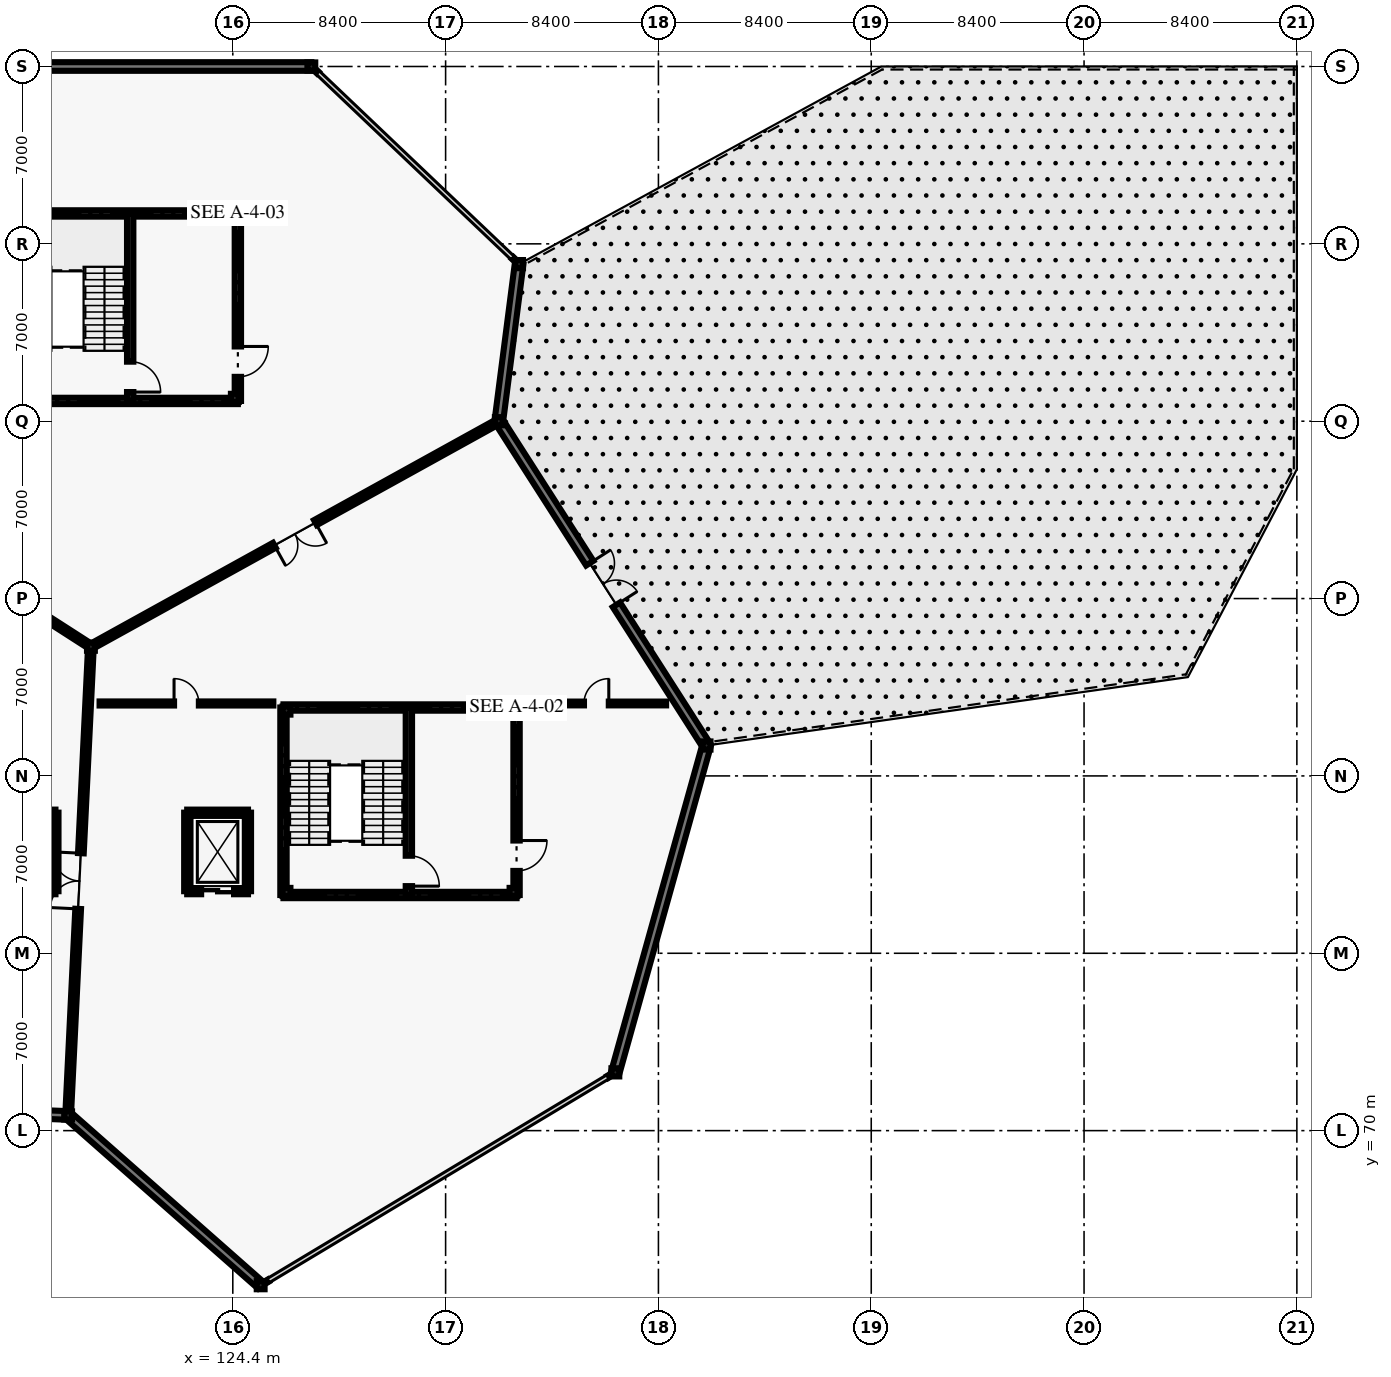
"""IFC4 building model, lengths in metres.
Left out: names, types, materials, properties, quantities, classifications, styles, units other than length and angle.
Written with IfcOpenShell. Run it as: python <this file> out.ifc"""

import sys

from ifc_helpers import new_model, si_unit, direction, frame, frame_2d, origin, origin_2d, place, context, subcontext, project, spatial, rectangle, i_section, extrude, element, fill, save


model = new_model("IFC4")
c1 = context("Model", 3, precision=1e-05, world=origin(), true_north=direction((0.0, 1.0)))
c2 = subcontext(c1, "Body", "Model", "MODEL_VIEW")
j1 = project(units=[si_unit("LENGTHUNIT", "METRE"), si_unit("PLANEANGLEUNIT", "RADIAN")], contexts=[c1])
p1 = place(None, origin())
s1 = spatial("IfcSite", under=j1, at=p1, CompositionType="ELEMENT")
p2 = place(p1, origin())
s2 = spatial("IfcBuilding", under=s1, at=p2, CompositionType="ELEMENT")
p3 = place(p2, frame((0.0, 0.0, 15.0)))
s3 = spatial("IfcBuildingStorey", under=s2, at=p3, CompositionType="ELEMENT", Elevation=15.0)
for number, where, z_axis, x_axis in (
    (1, (117.9, 70.6, 0.0), (0.0, 0.0, 1.0), (1.0, 0.0, 0.0)),
    (2, (118.8, 89.1, 0.0), (0.0, 0.0, 1.0), (1.0, 0.0, 0.0)),
    (3, (125.5, 63.9, 0.0), (0.0, 0.0, 1.0), (1.0, 0.0, 0.0)),
    (4, (127.5, 112.0, 0.0), (0.0, 0.0, 1.0), (1.0, 0.0, 0.0)),
    (5, (134.9, 98.0, 0.0), (0.0, 0.0, 1.0), (1.0, 0.0, 0.0)),
    (6, (135.7, 104.2, 0.0), (0.0, 0.0, 1.0), (1.0, 0.0, 0.0)),
    (7, (139.5, 72.3, 0.0), (0.0, 0.0, 1.0), (1.0, 0.0, 0.0)),
    (8, (143.1, 85.2, 0.0), (0.0, 0.0, 1.0), (1.0, 0.0, 0.0)),
    (9, (126.52, 79.42, 0.0), (0.0, 0.0, 1.0), (1.0, 0.0, 0.0)),
    (10, (135.48, 79.42, 0.0), (0.0, 0.0, 1.0), (1.0, 0.0, 0.0)),
    (11, (135.48, 86.58, 0.0), (0.0, 0.0, 1.0), (1.0, 0.0, 0.0)),
    (12, (126.52, 86.58, 0.0), (0.0, 0.0, 1.0), (1.0, 0.0, 0.0)),
    (13, (124.48, 98.92, 0.0), (0.0, 0.0, 1.0), (1.0, 0.0, 0.0)),
    (14, (124.48, 106.08, 0.0), (0.0, 0.0, 1.0), (1.0, 0.0, 0.0)),
):
    element("IfcColumn", number, at=place(p3, frame(where, z_axis=z_axis, x_axis=x_axis)), inside=s3, PredefinedType="COLUMN", context=c2, shape_type="SweptSolid", body=[
        extrude(i_section(OverallWidth=0.309, OverallDepth=0.321, WebThickness=0.014, FlangeThickness=0.022, FilletRadius=0.017, at=origin_2d()), origin(), (0.0, 0.0, 1.0), 4.8),
    ])
p4 = place(p3, frame((117.84, 70.602, 0.0), z_axis=(0.0, 0.0, 1.0), x_axis=(-0.999284381651, 0.037824920194, 0.0)))
e15 = element("IfcWall", 15, at=p4, inside=s3, PredefinedType="SOLIDWALL", context=c2, shape_type="SweptSolid", body=[
    extrude(rectangle(XDim=18.453, YDim=0.34, at=frame_2d((9.227, 0.0))), origin(), (0.0, 0.0, 1.0), 3.62),
])
p5 = place(p3, frame((125.5, 63.9, 0.0), z_axis=(0.0, 0.0, 1.0), x_axis=(-0.750131359252, 0.661288850554, 0.0)))
e16 = element("IfcWall", 16, at=p5, inside=s3, PredefinedType="SOLIDWALL", context=c2, shape_type="SweptSolid", body=[
    extrude(rectangle(XDim=10.072, YDim=0.34, at=frame_2d((5.036, 0.0))), origin(), (0.0, 0.0, 1.0), 3.62),
])
for number, where, z_axis, x_axis in (
    (17, (139.464, 72.278, 0.0), (0.0, 0.0, 1.0), (-0.858, -0.513, 0.0)),
    (18, (125.8, 64.08, 0.0), (0.0, 0.0, 1.0), (-0.858, -0.513, 0.0)),
):
    element("IfcWall", number, at=place(p3, frame(where, z_axis=z_axis, x_axis=x_axis)), inside=s3, PredefinedType="SOLIDWALL", context=c2, shape_type="SweptSolid", body=[
        extrude(rectangle(XDim=0.308, YDim=0.095, at=frame_2d((0.154, 0.0))), origin(), (0.0, 0.0, 1.0), 3.62),
    ])
p6 = place(p3, frame((143.1, 85.2, 0.0), z_axis=(0.0, 0.0, 1.0), x_axis=(-0.268807620494, -0.96319388659, 0.0)))
e19 = element("IfcWall", 19, at=p6, inside=s3, PredefinedType="SOLIDWALL", context=c2, shape_type="SweptSolid", body=[
    extrude(rectangle(XDim=13.393, YDim=0.34, at=frame_2d((6.696, 0.0))), origin(), (0.0, 0.0, 1.0), 3.62),
])
p7 = place(p3, frame((134.932, 97.95, 0.0), z_axis=(0.0, 0.0, 1.0), x_axis=(0.539438422375, -0.84202505216, 0.0)))
e20 = element("IfcWall", 20, at=p7, inside=s3, PredefinedType="SOLIDWALL", context=c2, shape_type="SweptSolid", body=[
    extrude(rectangle(XDim=15.142, YDim=0.34, at=frame_2d((7.571, 0.0))), origin(), (0.0, 0.0, 1.0), 3.62),
])
p8 = place(p7, frame((6.596, 0.0, 0.0)))
e21 = element("IfcOpeningElement", 21, at=p8, cuts=e20, PredefinedType="OPENING", context=c2, shape_type="SweptSolid", body=[
    extrude(rectangle(XDim=1.95, YDim=2.3, at=frame_2d((0.975, 1.15))), frame((0.0, 0.18, 0.0), z_axis=(0.0, -1.0, 0.0), x_axis=(1.0, 0.0, 0.0)), (0.0, 0.0, 1.0), 0.36),
])
p9 = place(p3, frame((135.7, 104.2, 0.0), z_axis=(0.0, 0.0, 1.0), x_axis=(-0.127911284164, -0.99178561362, 0.0)))
e22 = element("IfcWall", 22, at=p9, inside=s3, PredefinedType="SOLIDWALL", context=c2, shape_type="SweptSolid", body=[
    extrude(rectangle(XDim=6.192, YDim=0.34, at=frame_2d((3.096, 0.0))), origin(), (0.0, 0.0, 1.0), 3.62),
])
for number, where, z_axis, x_axis in (
    (23, (127.53, 111.971, 0.0), (0.0, 0.0, 1.0), (0.726, -0.687, 0.0)),
    (24, (135.446, 104.441, 0.0), (0.0, 0.0, 1.0), (0.726, -0.687, 0.0)),
):
    element("IfcWall", number, at=place(p3, frame(where, z_axis=z_axis, x_axis=x_axis)), inside=s3, PredefinedType="SOLIDWALL", context=c2, shape_type="SweptSolid", body=[
        extrude(rectangle(XDim=0.308, YDim=0.095, at=frame_2d((0.154, 0.0))), origin(), (0.0, 0.0, 1.0), 3.62),
    ])
p10 = place(p3, frame((113.4, 112.0, 0.0), z_axis=(0.0, 0.0, 1.0), x_axis=(1.0, 0.0, 0.0)))
e25 = element("IfcWall", 25, at=p10, inside=s3, PredefinedType="SOLIDWALL", context=c2, shape_type="SweptSolid", body=[
    extrude(rectangle(XDim=14.1, YDim=0.34, at=frame_2d((7.05, 0.0))), origin(), (0.0, 0.0, 1.0), 3.62),
])
p11 = place(p3, frame((117.9, 70.6, 0.0), z_axis=(0.0, 0.0, 1.0), x_axis=(0.048599072515, 0.998818366947, 0.0)))
e26 = element("IfcWall", 26, at=p11, inside=s3, PredefinedType="SOLIDWALL", context=c2, shape_type="SweptSolid", body=[
    extrude(rectangle(XDim=18.522, YDim=0.225, at=frame_2d((9.261, 0.0))), origin(), (0.0, 0.0, 1.0), 4.02),
])
p12 = place(p11, frame((8.161, 0.0, 0.0)))
e27 = element("IfcOpeningElement", 27, at=p12, cuts=e26, PredefinedType="OPENING", context=c2, shape_type="SweptSolid", body=[
    extrude(rectangle(XDim=2.2, YDim=2.6, at=frame_2d((1.1, 1.3))), frame((0.0, 0.123, 0.0), z_axis=(0.0, -1.0, 0.0), x_axis=(1.0, 0.0, 0.0)), (0.0, 0.0, 1.0), 0.245),
])
p13 = place(p3, frame((118.8, 89.1, 0.0), z_axis=(0.0, 0.0, 1.0), x_axis=(-0.841183241423, 0.540750177392, 0.0)))
e28 = element("IfcWall", 28, at=p13, inside=s3, PredefinedType="SOLIDWALL", context=c2, shape_type="SweptSolid", body=[
    extrude(rectangle(XDim=18.308, YDim=0.225, at=frame_2d((9.154, 0.0))), origin(), (0.0, 0.0, 1.0), 4.02),
])
p14 = place(p13, frame((8.154, 0.0, 0.0)))
e29 = element("IfcOpeningElement", 29, at=p14, cuts=e28, PredefinedType="OPENING", context=c2, shape_type="SweptSolid", body=[
    extrude(rectangle(XDim=2.0, YDim=2.5, at=frame_2d((1.0, 1.25))), frame((0.0, 0.123, 0.0), z_axis=(0.0, -1.0, 0.0), x_axis=(1.0, 0.0, 0.0)), (0.0, 0.0, 1.0), 0.245),
])
p15 = place(p3, frame((134.9, 98.0, 0.0), z_axis=(0.0, 0.0, 1.0), x_axis=(-0.875181353329, -0.483794996652, 0.0)))
e30 = element("IfcWall", 30, at=p15, inside=s3, PredefinedType="SOLIDWALL", context=c2, shape_type="SweptSolid", body=[
    extrude(rectangle(XDim=18.396, YDim=0.225, at=frame_2d((9.198, 0.0))), origin(), (0.0, 0.0, 1.0), 4.02),
])
p16 = place(p15, frame((8.273, 0.0, 0.0)))
e31 = element("IfcOpeningElement", 31, at=p16, cuts=e30, PredefinedType="OPENING", context=c2, shape_type="SweptSolid", body=[
    extrude(rectangle(XDim=1.85, YDim=2.4, at=frame_2d((0.925, 1.2))), frame((0.0, 0.123, 0.0), z_axis=(0.0, -1.0, 0.0), x_axis=(1.0, 0.0, 0.0)), (0.0, 0.0, 1.0), 0.245),
])
p17 = place(p3, frame((119.142, 86.859, 0.0), z_axis=(0.0, 0.0, 1.0), x_axis=(1.0, 0.0, 0.0)))
e32 = element("IfcWall", 32, at=p17, inside=s3, PredefinedType="PARTITIONING", context=c2, shape_type="SweptSolid", body=[
    extrude(rectangle(XDim=6.858, YDim=0.16, at=frame_2d((3.429, 0.0))), origin(), (0.0, 0.0, 1.0), 3.32),
])
p18 = place(p17, frame((2.939, 0.0, 0.0)))
e33 = element("IfcOpeningElement", 33, at=p18, cuts=e32, PredefinedType="OPENING", context=c2, shape_type="SweptSolid", body=[
    extrude(rectangle(XDim=0.98, YDim=2.15, at=frame_2d((0.49, 1.075))), frame((0.0, 0.09, 0.0), z_axis=(0.0, -1.0, 0.0), x_axis=(1.0, 0.0, 0.0)), (0.0, 0.0, 1.0), 0.18),
])
p19 = place(p3, frame((136.0, 86.859, 0.0), z_axis=(0.0, 0.0, 1.0), x_axis=(1.0, 0.0, 0.0)))
e34 = element("IfcWall", 34, at=p19, inside=s3, PredefinedType="PARTITIONING", context=c2, shape_type="SweptSolid", body=[
    extrude(rectangle(XDim=5.503, YDim=0.15, at=frame_2d((2.751, 0.0))), origin(), (0.0, 0.0, 1.0), 3.32),
])
p20 = place(p19, frame((2.261, 0.0, 0.0)))
e35 = element("IfcOpeningElement", 35, at=p20, cuts=e34, PredefinedType="OPENING", context=c2, shape_type="SweptSolid", body=[
    extrude(rectangle(XDim=0.98, YDim=2.15, at=frame_2d((0.49, 1.075))), frame((0.0, 0.085, 0.0), z_axis=(0.0, -1.0, 0.0), x_axis=(1.0, 0.0, 0.0)), (0.0, 0.0, 1.0), 0.17),
])
p21 = place(p3, frame((126.4, 79.3, 0.0), z_axis=(0.0, 0.0, 1.0), x_axis=(0.0, 1.0, 0.0)))
e36 = element("IfcWall", 36, at=p21, inside=s3, PredefinedType="SHEAR", context=c2, shape_type="SweptSolid", body=[
    extrude(rectangle(XDim=7.4, YDim=0.25, at=frame_2d((3.7, 0.0))), origin(), (0.0, 0.0, 1.0), 4.56),
])
for number, where, z_axis, x_axis in (
    (37, (126.4, 86.7, 0.0), (0.0, 0.0, 1.0), (1.0, 0.0, 0.0)),
    (38, (135.6, 79.3, 0.0), (0.0, 0.0, 1.0), (-1.0, 0.0, 0.0)),
):
    element("IfcWall", number, at=place(p3, frame(where, z_axis=z_axis, x_axis=x_axis)), inside=s3, PredefinedType="SHEAR", context=c2, shape_type="SweptSolid", body=[
        extrude(rectangle(XDim=9.2, YDim=0.25, at=frame_2d((4.6, 0.0))), origin(), (0.0, 0.0, 1.0), 4.56),
    ])
p22 = place(p3, frame((135.6, 86.7, 0.0), z_axis=(0.0, 0.0, 1.0), x_axis=(0.0, -1.0, 0.0)))
e39 = element("IfcWall", 39, at=p22, inside=s3, PredefinedType="SHEAR", context=c2, shape_type="SweptSolid", body=[
    extrude(rectangle(XDim=7.4, YDim=0.25, at=frame_2d((3.7, 0.0))), origin(), (0.0, 0.0, 1.0), 4.56),
])
p23 = place(p22, frame((5.25, 0.0, 0.0)))
e40 = element("IfcOpeningElement", 40, at=p23, cuts=e39, PredefinedType="OPENING", context=c2, shape_type="SweptSolid", body=[
    extrude(rectangle(XDim=1.2, YDim=2.2, at=frame_2d((0.6, 1.1))), frame((0.0, 0.135, 0.0), z_axis=(0.0, -1.0, 0.0), x_axis=(1.0, 0.0, 0.0)), (0.0, 0.0, 1.0), 0.27),
])
p24 = place(p3, frame((131.35, 86.7, 0.0), z_axis=(0.0, 0.0, 1.0), x_axis=(0.0, -1.0, 0.0)))
e41 = element("IfcWall", 41, at=p24, inside=s3, PredefinedType="SHEAR", context=c2, shape_type="SweptSolid", body=[
    extrude(rectangle(XDim=7.4, YDim=0.25, at=frame_2d((3.7, 0.0))), origin(), (0.0, 0.0, 1.0), 4.56),
])
p25 = place(p24, frame((5.85, 0.0, 0.0)))
e42 = element("IfcOpeningElement", 42, at=p25, cuts=e41, PredefinedType="OPENING", context=c2, shape_type="SweptSolid", body=[
    extrude(rectangle(XDim=1.2, YDim=2.2, at=frame_2d((0.6, 1.1))), frame((0.0, 0.135, 0.0), z_axis=(0.0, -1.0, 0.0), x_axis=(1.0, 0.0, 0.0)), (0.0, 0.0, 1.0), 0.27),
])
for number, where, z_axis, x_axis in (
    (43, (115.4, 106.2, 0.0), (0.0, 0.0, 1.0), (1.0, 0.0, 0.0)),
    (44, (124.6, 98.8, 0.0), (0.0, 0.0, 1.0), (-1.0, 0.0, 0.0)),
):
    element("IfcWall", number, at=place(p3, frame(where, z_axis=z_axis, x_axis=x_axis)), inside=s3, PredefinedType="SHEAR", context=c2, shape_type="SweptSolid", body=[
        extrude(rectangle(XDim=9.2, YDim=0.25, at=frame_2d((4.6, 0.0))), origin(), (0.0, 0.0, 1.0), 4.56),
    ])
p26 = place(p3, frame((124.6, 106.2, 0.0), z_axis=(0.0, 0.0, 1.0), x_axis=(0.0, -1.0, 0.0)))
e45 = element("IfcWall", 45, at=p26, inside=s3, PredefinedType="SHEAR", context=c2, shape_type="SweptSolid", body=[
    extrude(rectangle(XDim=7.4, YDim=0.25, at=frame_2d((3.7, 0.0))), origin(), (0.0, 0.0, 1.0), 4.56),
])
p27 = place(p26, frame((5.25, 0.0, 0.0)))
e46 = element("IfcOpeningElement", 46, at=p27, cuts=e45, PredefinedType="OPENING", context=c2, shape_type="SweptSolid", body=[
    extrude(rectangle(XDim=1.2, YDim=2.2, at=frame_2d((0.6, 1.1))), frame((0.0, 0.135, 0.0), z_axis=(0.0, -1.0, 0.0), x_axis=(1.0, 0.0, 0.0)), (0.0, 0.0, 1.0), 0.27),
])
p28 = place(p3, frame((120.35, 106.2, 0.0), z_axis=(0.0, 0.0, 1.0), x_axis=(0.0, -1.0, 0.0)))
e47 = element("IfcWall", 47, at=p28, inside=s3, PredefinedType="SHEAR", context=c2, shape_type="SweptSolid", body=[
    extrude(rectangle(XDim=7.4, YDim=0.25, at=frame_2d((3.7, 0.0))), origin(), (0.0, 0.0, 1.0), 4.56),
])
p29 = place(p28, frame((5.85, 0.0, 0.0)))
e48 = element("IfcOpeningElement", 48, at=p29, cuts=e47, PredefinedType="OPENING", context=c2, shape_type="SweptSolid", body=[
    extrude(rectangle(XDim=1.2, YDim=2.2, at=frame_2d((0.6, 1.1))), frame((0.0, 0.135, 0.0), z_axis=(0.0, -1.0, 0.0), x_axis=(1.0, 0.0, 0.0)), (0.0, 0.0, 1.0), 0.27),
])
p30 = place(p3, frame((115.0, 82.55, 0.0), z_axis=(0.0, 0.0, 1.0), x_axis=(1.0, 0.0, 0.0)))
e49 = element("IfcWall", 49, at=p30, inside=s3, PredefinedType="SHEAR", context=c2, shape_type="SweptSolid", body=[
    extrude(rectangle(XDim=2.4, YDim=0.24, at=frame_2d((1.2, 0.0))), origin(), (0.0, 0.0, 1.0), 4.56),
])
p31 = place(p3, frame((117.4, 82.55, 0.0), z_axis=(0.0, 0.0, 1.0), x_axis=(0.0, -1.0, 0.0)))
e50 = element("IfcWall", 50, at=p31, inside=s3, PredefinedType="SHEAR", context=c2, shape_type="SweptSolid", body=[
    extrude(rectangle(XDim=3.1, YDim=0.24, at=frame_2d((1.55, 0.0))), origin(), (0.0, 0.0, 1.0), 4.56),
])
p32 = place(p3, frame((117.4, 79.45, 0.0), z_axis=(0.0, 0.0, 1.0), x_axis=(-1.0, 0.0, 0.0)))
e51 = element("IfcWall", 51, at=p32, inside=s3, PredefinedType="SHEAR", context=c2, shape_type="SweptSolid", body=[
    extrude(rectangle(XDim=2.4, YDim=0.24, at=frame_2d((1.2, 0.0))), origin(), (0.0, 0.0, 1.0), 4.56),
])
p33 = place(p32, frame((0.55, 0.0, 0.0)))
e52 = element("IfcOpeningElement", 52, at=p33, cuts=e51, PredefinedType="OPENING", context=c2, shape_type="SweptSolid", body=[
    extrude(rectangle(XDim=1.3, YDim=2.25, at=frame_2d((0.65, 1.125))), frame((0.0, 0.13, 0.0), z_axis=(0.0, -1.0, 0.0), x_axis=(1.0, 0.0, 0.0)), (0.0, 0.0, 1.0), 0.26),
])
p34 = place(p3, frame((122.6, 82.55, 0.0), z_axis=(0.0, 0.0, 1.0), x_axis=(1.0, 0.0, 0.0)))
e53 = element("IfcWall", 53, at=p34, inside=s3, PredefinedType="SHEAR", context=c2, shape_type="SweptSolid", body=[
    extrude(rectangle(XDim=2.4, YDim=0.24, at=frame_2d((1.2, 0.0))), origin(), (0.0, 0.0, 1.0), 4.56),
])
for number, where, z_axis, x_axis in (
    (54, (125.0, 82.55, 0.0), (0.0, 0.0, 1.0), (0.0, -1.0, 0.0)),
    (55, (122.6, 79.45, 0.0), (0.0, 0.0, 1.0), (0.0, 1.0, 0.0)),
):
    element("IfcWall", number, at=place(p3, frame(where, z_axis=z_axis, x_axis=x_axis)), inside=s3, PredefinedType="SHEAR", context=c2, shape_type="SweptSolid", body=[
        extrude(rectangle(XDim=3.1, YDim=0.24, at=frame_2d((1.55, 0.0))), origin(), (0.0, 0.0, 1.0), 4.56),
    ])
p35 = place(p3, frame((125.0, 79.45, 0.0), z_axis=(0.0, 0.0, 1.0), x_axis=(-1.0, 0.0, 0.0)))
e56 = element("IfcWall", 56, at=p35, inside=s3, PredefinedType="SHEAR", context=c2, shape_type="SweptSolid", body=[
    extrude(rectangle(XDim=2.4, YDim=0.24, at=frame_2d((1.2, 0.0))), origin(), (0.0, 0.0, 1.0), 4.56),
])
p36 = place(p35, frame((0.55, 0.0, 0.0)))
e57 = element("IfcOpeningElement", 57, at=p36, cuts=e56, PredefinedType="OPENING", context=c2, shape_type="SweptSolid", body=[
    extrude(rectangle(XDim=1.3, YDim=2.25, at=frame_2d((0.65, 1.125))), frame((0.0, 0.13, 0.0), z_axis=(0.0, -1.0, 0.0), x_axis=(1.0, 0.0, 0.0)), (0.0, 0.0, 1.0), 0.26),
])
p37 = place(p8, origin())
e58 = element("IfcDoor", 58, at=p37, inside=s3, OperationType="DOUBLE_DOOR_SINGLE_SWING", PredefinedType="DOOR", context=c2, shape_type="SweptSolid", body=[
    extrude(rectangle(XDim=1.95, YDim=2.3, at=frame_2d((0.975, 1.15))), frame((0.0, 0.025, 0.0), z_axis=(0.0, -1.0, 0.0), x_axis=(1.0, 0.0, 0.0)), (0.0, 0.0, 1.0), 0.05),
])
fill(e21, e58)
p38 = place(p12, origin())
e59 = element("IfcDoor", 59, at=p38, inside=s3, OperationType="DOUBLE_DOOR_SINGLE_SWING", PredefinedType="DOOR", context=c2, shape_type="SweptSolid", body=[
    extrude(rectangle(XDim=2.2, YDim=2.6, at=frame_2d((1.1, 1.3))), frame((0.0, 0.025, 0.0), z_axis=(0.0, -1.0, 0.0), x_axis=(1.0, 0.0, 0.0)), (0.0, 0.0, 1.0), 0.05),
])
fill(e27, e59)
p39 = place(p16, origin())
e60 = element("IfcDoor", 60, at=p39, inside=s3, OperationType="DOUBLE_DOOR_SINGLE_SWING", PredefinedType="DOOR", context=c2, shape_type="SweptSolid", body=[
    extrude(rectangle(XDim=1.85, YDim=2.4, at=frame_2d((0.925, 1.2))), frame((0.0, 0.025, 0.0), z_axis=(0.0, -1.0, 0.0), x_axis=(1.0, 0.0, 0.0)), (0.0, 0.0, 1.0), 0.05),
])
fill(e31, e60)
p40 = place(p18, origin())
e61 = element("IfcDoor", 61, at=p40, inside=s3, OperationType="SINGLE_SWING_LEFT", PredefinedType="DOOR", context=c2, shape_type="SweptSolid", body=[
    extrude(rectangle(XDim=0.98, YDim=2.15, at=frame_2d((0.49, 1.075))), frame((0.0, 0.025, 0.0), z_axis=(0.0, -1.0, 0.0), x_axis=(1.0, 0.0, 0.0)), (0.0, 0.0, 1.0), 0.05),
])
fill(e33, e61)
p41 = place(p20, origin())
e62 = element("IfcDoor", 62, at=p41, inside=s3, OperationType="SINGLE_SWING_RIGHT", PredefinedType="DOOR", context=c2, shape_type="SweptSolid", body=[
    extrude(rectangle(XDim=0.98, YDim=2.15, at=frame_2d((0.49, 1.075))), frame((0.0, 0.025, 0.0), z_axis=(0.0, -1.0, 0.0), x_axis=(1.0, 0.0, 0.0)), (0.0, 0.0, 1.0), 0.05),
])
fill(e35, e62)
p42 = place(p23, origin())
e63 = element("IfcDoor", 63, at=p42, inside=s3, OperationType="SINGLE_SWING_LEFT", PredefinedType="DOOR", context=c2, shape_type="SweptSolid", body=[
    extrude(rectangle(XDim=1.2, YDim=2.2, at=frame_2d((0.6, 1.1))), frame((0.0, 0.025, 0.0), z_axis=(0.0, -1.0, 0.0), x_axis=(1.0, 0.0, 0.0)), (0.0, 0.0, 1.0), 0.05),
])
fill(e40, e63)
p43 = place(p25, origin())
e64 = element("IfcDoor", 64, at=p43, inside=s3, OperationType="SINGLE_SWING_RIGHT", PredefinedType="DOOR", context=c2, shape_type="SweptSolid", body=[
    extrude(rectangle(XDim=1.2, YDim=2.2, at=frame_2d((0.6, 1.1))), frame((0.0, 0.025, 0.0), z_axis=(0.0, -1.0, 0.0), x_axis=(1.0, 0.0, 0.0)), (0.0, 0.0, 1.0), 0.05),
])
fill(e42, e64)
p44 = place(p27, origin())
e65 = element("IfcDoor", 65, at=p44, inside=s3, OperationType="SINGLE_SWING_LEFT", PredefinedType="DOOR", context=c2, shape_type="SweptSolid", body=[
    extrude(rectangle(XDim=1.2, YDim=2.2, at=frame_2d((0.6, 1.1))), frame((0.0, 0.025, 0.0), z_axis=(0.0, -1.0, 0.0), x_axis=(1.0, 0.0, 0.0)), (0.0, 0.0, 1.0), 0.05),
])
fill(e46, e65)
p45 = place(p29, origin())
e66 = element("IfcDoor", 66, at=p45, inside=s3, OperationType="SINGLE_SWING_RIGHT", PredefinedType="DOOR", context=c2, shape_type="SweptSolid", body=[
    extrude(rectangle(XDim=1.2, YDim=2.2, at=frame_2d((0.6, 1.1))), frame((0.0, 0.025, 0.0), z_axis=(0.0, -1.0, 0.0), x_axis=(1.0, 0.0, 0.0)), (0.0, 0.0, 1.0), 0.05),
])
fill(e48, e66)
p46 = place(p36, origin())
e67 = element("IfcDoor", 67, at=p46, inside=s3, OperationType="SLIDING_TO_LEFT", PredefinedType="DOOR", context=c2, shape_type="SweptSolid", body=[
    extrude(rectangle(XDim=1.3, YDim=2.25, at=frame_2d((0.65, 1.125))), frame((0.0, 0.025, 0.0), z_axis=(0.0, -1.0, 0.0), x_axis=(1.0, 0.0, 0.0)), (0.0, 0.0, 1.0), 0.05),
])
fill(e57, e67)
save(model, sys.argv[1])
